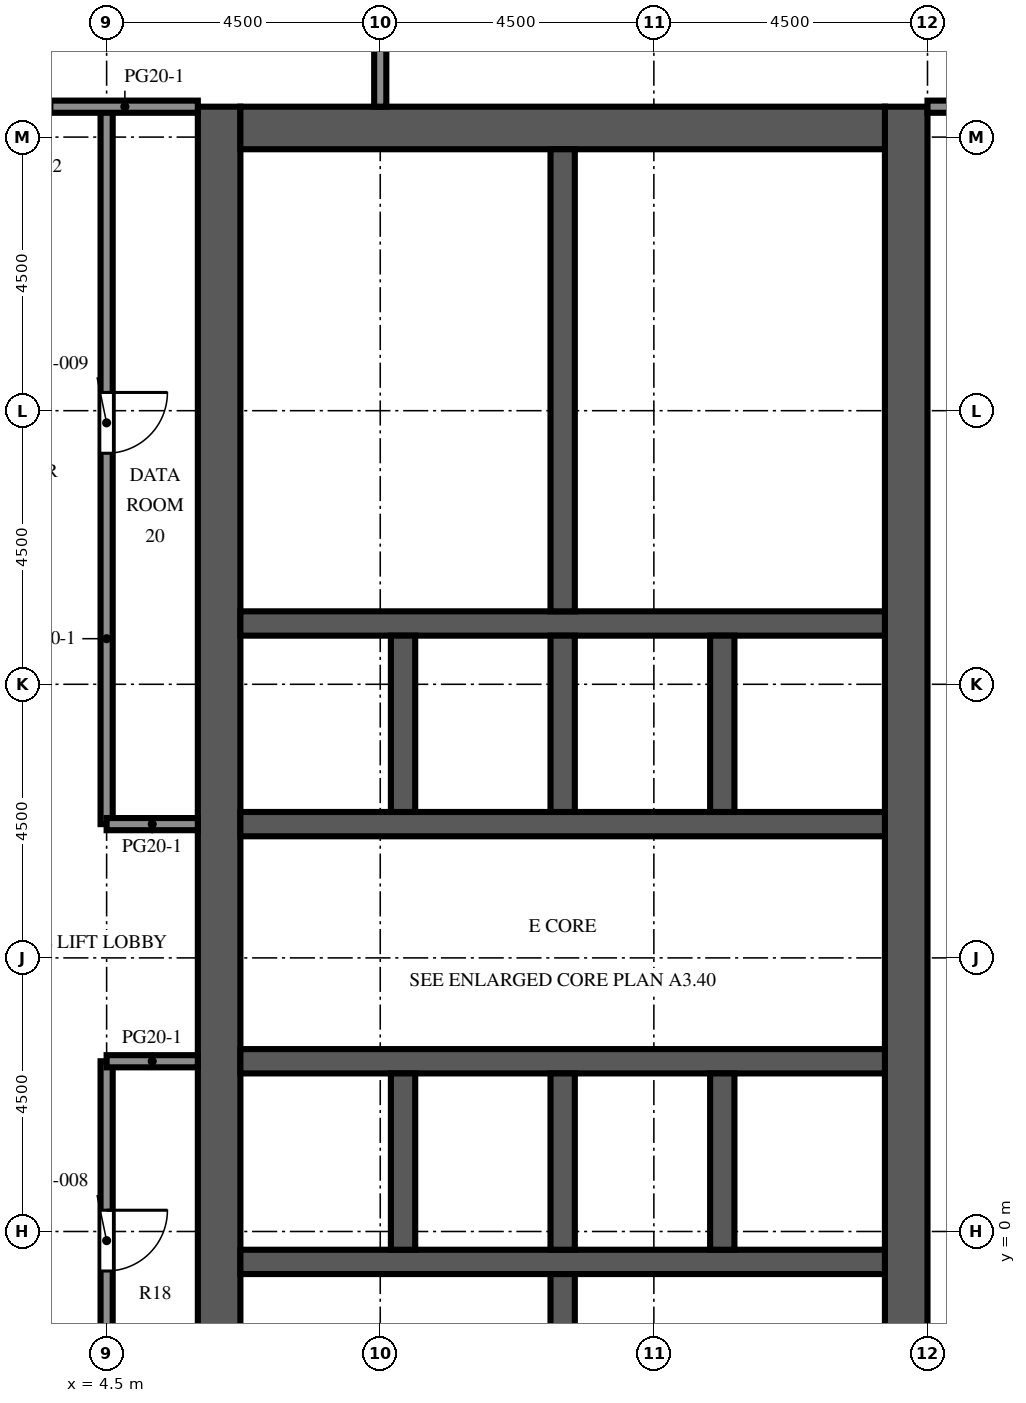
"""IFC4 building model, lengths in metres.
Left out: names, types, materials, properties, quantities, classifications, styles, units other than length and angle.
Written with IfcOpenShell. Run it as: python <this file> out.ifc"""

import sys

from ifc_helpers import new_model, si_unit, direction, frame, frame_2d, origin, place, context, subcontext, project, spatial, rectangle, extrude, element, fill, save


model = new_model("IFC4")
c1 = context("Model", 3, precision=1e-05, world=origin(), true_north=direction((0.0, 1.0)))
c2 = subcontext(c1, "Body", "Model", "MODEL_VIEW")
j1 = project(units=[si_unit("LENGTHUNIT", "METRE"), si_unit("PLANEANGLEUNIT", "RADIAN")], contexts=[c1])
p1 = place(None, origin())
s1 = spatial("IfcSite", under=j1, at=p1, CompositionType="ELEMENT")
p2 = place(p1, origin())
s2 = spatial("IfcBuilding", under=s1, at=p2, CompositionType="ELEMENT")
p3 = place(p2, frame((0.0, 0.0, 270.4)))
s3 = spatial("IfcBuildingStorey", under=s2, at=p3, CompositionType="ELEMENT", Elevation=270.4)
p4 = place(p3, frame((6.35, -9.0, 0.0), z_axis=(0.0, 0.0, 1.0), x_axis=(0.0, 1.0, 0.0)))
e1 = element("IfcWall", 1, at=p4, inside=s3, PredefinedType="SHEAR", context=c2, shape_type="SweptSolid", body=[
    extrude(rectangle(XDim=27.5, YDim=0.7, at=frame_2d((13.75, 0.0))), origin(), (0.0, 0.0, 1.0), 4.1),
])
p5 = place(p4, frame((12.55, 0.0, 0.0)))
e2 = element("IfcOpeningElement", 2, at=p5, cuts=e1, PredefinedType="OPENING", context=c2, shape_type="SweptSolid", body=[
    extrude(rectangle(XDim=2.4, YDim=2.4, at=frame_2d((1.2, 1.2))), frame((0.0, 0.36, 0.0), z_axis=(0.0, -1.0, 0.0), x_axis=(1.0, 0.0, 0.0)), (0.0, 0.0, 1.0), 0.72),
])
p6 = place(p4, frame((3.9, 0.0, 0.0)))
e3 = element("IfcOpeningElement", 3, at=p6, cuts=e1, PredefinedType="OPENING", context=c2, shape_type="SweptSolid", body=[
    extrude(rectangle(XDim=1.2, YDim=2.1, at=frame_2d((0.6, 1.05))), frame((0.0, 0.36, 0.0), z_axis=(0.0, -1.0, 0.0), x_axis=(1.0, 0.0, 0.0)), (0.0, 0.0, 1.0), 0.72),
])
p7 = place(p4, frame((19.46, 0.0, 0.0)))
e4 = element("IfcOpeningElement", 4, at=p7, cuts=e1, PredefinedType="OPENING", context=c2, shape_type="SweptSolid", body=[
    extrude(rectangle(XDim=1.0, YDim=2.1, at=frame_2d((0.5, 1.05))), frame((0.0, 0.36, 0.0), z_axis=(0.0, -1.0, 0.0), x_axis=(1.0, 0.0, 0.0)), (0.0, 0.0, 1.0), 0.72),
])
p8 = place(p4, frame((21.17, 0.0, 0.0)))
e5 = element("IfcOpeningElement", 5, at=p8, cuts=e1, PredefinedType="OPENING", context=c2, shape_type="SweptSolid", body=[
    extrude(rectangle(XDim=1.0, YDim=2.1, at=frame_2d((0.5, 1.05))), frame((0.0, 0.36, 0.0), z_axis=(0.0, -1.0, 0.0), x_axis=(1.0, 0.0, 0.0)), (0.0, 0.0, 1.0), 0.72),
])
p9 = place(p4, frame((23.26, 0.0, 0.0)))
e6 = element("IfcOpeningElement", 6, at=p9, cuts=e1, PredefinedType="OPENING", context=c2, shape_type="SweptSolid", body=[
    extrude(rectangle(XDim=1.0, YDim=2.1, at=frame_2d((0.5, 1.05))), frame((0.0, 0.36, 0.0), z_axis=(0.0, -1.0, 0.0), x_axis=(1.0, 0.0, 0.0)), (0.0, 0.0, 1.0), 0.72),
])
p10 = place(p4, frame((25.35, 0.0, 0.0)))
e7 = element("IfcOpeningElement", 7, at=p10, cuts=e1, PredefinedType="OPENING", context=c2, shape_type="SweptSolid", body=[
    extrude(rectangle(XDim=1.0, YDim=2.1, at=frame_2d((0.5, 1.05))), frame((0.0, 0.36, 0.0), z_axis=(0.0, -1.0, 0.0), x_axis=(1.0, 0.0, 0.0)), (0.0, 0.0, 1.0), 0.72),
])
p11 = place(p3, frame((17.65, -9.0, 0.0), z_axis=(0.0, 0.0, 1.0), x_axis=(0.0, 1.0, 0.0)))
e8 = element("IfcWall", 8, at=p11, inside=s3, PredefinedType="SHEAR", context=c2, shape_type="SweptSolid", body=[
    extrude(rectangle(XDim=27.5, YDim=0.7, at=frame_2d((13.75, 0.0))), origin(), (0.0, 0.0, 1.0), 4.1),
])
p12 = place(p11, frame((12.55, 0.0, 0.0)))
e9 = element("IfcOpeningElement", 9, at=p12, cuts=e8, PredefinedType="OPENING", context=c2, shape_type="SweptSolid", body=[
    extrude(rectangle(XDim=2.4, YDim=2.4, at=frame_2d((1.2, 1.2))), frame((0.0, 0.36, 0.0), z_axis=(0.0, -1.0, 0.0), x_axis=(1.0, 0.0, 0.0)), (0.0, 0.0, 1.0), 0.72),
])
p13 = place(p11, frame((6.825, 0.0, 0.0)))
e10 = element("IfcOpeningElement", 10, at=p13, cuts=e8, PredefinedType="OPENING", context=c2, shape_type="SweptSolid", body=[
    extrude(rectangle(XDim=1.2, YDim=2.1, at=frame_2d((0.6, 1.05))), frame((0.0, 0.36, 0.0), z_axis=(0.0, -1.0, 0.0), x_axis=(1.0, 0.0, 0.0)), (0.0, 0.0, 1.0), 0.72),
])
p14 = place(p11, frame((19.475, 0.0, 0.0)))
e11 = element("IfcOpeningElement", 11, at=p14, cuts=e8, PredefinedType="OPENING", context=c2, shape_type="SweptSolid", body=[
    extrude(rectangle(XDim=1.2, YDim=2.1, at=frame_2d((0.6, 1.05))), frame((0.0, 0.36, 0.0), z_axis=(0.0, -1.0, 0.0), x_axis=(1.0, 0.0, 0.0)), (0.0, 0.0, 1.0), 0.72),
])
p15 = place(p3, frame((6.7, 18.15, 0.0), z_axis=(0.0, 0.0, 1.0), x_axis=(1.0, 0.0, 0.0)))
e12 = element("IfcWall", 12, at=p15, inside=s3, PredefinedType="SHEAR", context=c2, shape_type="SweptSolid", body=[
    extrude(rectangle(XDim=10.6, YDim=0.7, at=frame_2d((5.3, 0.0))), origin(), (0.0, 0.0, 1.0), 4.1),
])
p16 = place(p3, frame((6.7, -0.5, 0.0), z_axis=(0.0, 0.0, 1.0), x_axis=(1.0, 0.0, 0.0)))
e13 = element("IfcWall", 13, at=p16, inside=s3, PredefinedType="SHEAR", context=c2, shape_type="SweptSolid", body=[
    extrude(rectangle(XDim=10.6, YDim=0.4, at=frame_2d((5.3, 0.0))), origin(), (0.0, 0.0, 1.0), 4.1),
])
p17 = place(p3, frame((6.7, 2.8, 0.0), z_axis=(0.0, 0.0, 1.0), x_axis=(1.0, 0.0, 0.0)))
e14 = element("IfcWall", 14, at=p17, inside=s3, PredefinedType="SHEAR", context=c2, shape_type="SweptSolid", body=[
    extrude(rectangle(XDim=10.6, YDim=0.4, at=frame_2d((5.3, 0.0))), origin(), (0.0, 0.0, 1.0), 4.1),
])
p18 = place(p17, frame((0.688, 0.0, 0.0)))
e15 = element("IfcOpeningElement", 15, at=p18, cuts=e14, PredefinedType="OPENING", context=c2, shape_type="SweptSolid", body=[
    extrude(rectangle(XDim=1.1, YDim=2.1, at=frame_2d((0.55, 1.05))), frame((0.0, 0.21, 0.0), z_axis=(0.0, -1.0, 0.0), x_axis=(1.0, 0.0, 0.0)), (0.0, 0.0, 1.0), 0.42),
])
p19 = place(p17, frame((3.438, 0.0, 0.0)))
e16 = element("IfcOpeningElement", 16, at=p19, cuts=e14, PredefinedType="OPENING", context=c2, shape_type="SweptSolid", body=[
    extrude(rectangle(XDim=1.1, YDim=2.1, at=frame_2d((0.55, 1.05))), frame((0.0, 0.21, 0.0), z_axis=(0.0, -1.0, 0.0), x_axis=(1.0, 0.0, 0.0)), (0.0, 0.0, 1.0), 0.42),
])
p20 = place(p17, frame((6.113, 0.0, 0.0)))
e17 = element("IfcOpeningElement", 17, at=p20, cuts=e14, PredefinedType="OPENING", context=c2, shape_type="SweptSolid", body=[
    extrude(rectangle(XDim=1.0, YDim=2.1, at=frame_2d((0.5, 1.05))), frame((0.0, 0.21, 0.0), z_axis=(0.0, -1.0, 0.0), x_axis=(1.0, 0.0, 0.0)), (0.0, 0.0, 1.0), 0.42),
])
p21 = place(p17, frame((8.863, 0.0, 0.0)))
e18 = element("IfcOpeningElement", 18, at=p21, cuts=e14, PredefinedType="OPENING", context=c2, shape_type="SweptSolid", body=[
    extrude(rectangle(XDim=1.0, YDim=2.1, at=frame_2d((0.5, 1.05))), frame((0.0, 0.21, 0.0), z_axis=(0.0, -1.0, 0.0), x_axis=(1.0, 0.0, 0.0)), (0.0, 0.0, 1.0), 0.42),
])
p22 = place(p3, frame((6.7, 6.7, 0.0), z_axis=(0.0, 0.0, 1.0), x_axis=(1.0, 0.0, 0.0)))
e19 = element("IfcWall", 19, at=p22, inside=s3, PredefinedType="SHEAR", context=c2, shape_type="SweptSolid", body=[
    extrude(rectangle(XDim=10.6, YDim=0.4, at=frame_2d((5.3, 0.0))), origin(), (0.0, 0.0, 1.0), 4.1),
])
p23 = place(p22, frame((3.438, 0.0, 0.0)))
e20 = element("IfcOpeningElement", 20, at=p23, cuts=e19, PredefinedType="OPENING", context=c2, shape_type="SweptSolid", body=[
    extrude(rectangle(XDim=1.1, YDim=2.1, at=frame_2d((0.55, 1.05))), frame((0.0, 0.21, 0.0), z_axis=(0.0, -1.0, 0.0), x_axis=(1.0, 0.0, 0.0)), (0.0, 0.0, 1.0), 0.42),
])
p24 = place(p22, frame((6.062, 0.0, 0.0)))
e21 = element("IfcOpeningElement", 21, at=p24, cuts=e19, PredefinedType="OPENING", context=c2, shape_type="SweptSolid", body=[
    extrude(rectangle(XDim=1.1, YDim=2.1, at=frame_2d((0.55, 1.05))), frame((0.0, 0.21, 0.0), z_axis=(0.0, -1.0, 0.0), x_axis=(1.0, 0.0, 0.0)), (0.0, 0.0, 1.0), 0.42),
])
p25 = place(p22, frame((8.812, 0.0, 0.0)))
e22 = element("IfcOpeningElement", 22, at=p25, cuts=e19, PredefinedType="OPENING", context=c2, shape_type="SweptSolid", body=[
    extrude(rectangle(XDim=1.1, YDim=2.1, at=frame_2d((0.55, 1.05))), frame((0.0, 0.21, 0.0), z_axis=(0.0, -1.0, 0.0), x_axis=(1.0, 0.0, 0.0)), (0.0, 0.0, 1.0), 0.42),
])
p26 = place(p22, frame((0.738, 0.0, 0.0)))
e23 = element("IfcOpeningElement", 23, at=p26, cuts=e19, PredefinedType="OPENING", context=c2, shape_type="SweptSolid", body=[
    extrude(rectangle(XDim=1.0, YDim=2.1, at=frame_2d((0.5, 1.05))), frame((0.0, 0.21, 0.0), z_axis=(0.0, -1.0, 0.0), x_axis=(1.0, 0.0, 0.0)), (0.0, 0.0, 1.0), 0.42),
])
p27 = place(p3, frame((6.7, 10.0, 0.0), z_axis=(0.0, 0.0, 1.0), x_axis=(1.0, 0.0, 0.0)))
e24 = element("IfcWall", 24, at=p27, inside=s3, PredefinedType="SHEAR", context=c2, shape_type="SweptSolid", body=[
    extrude(rectangle(XDim=10.6, YDim=0.4, at=frame_2d((5.3, 0.0))), origin(), (0.0, 0.0, 1.0), 4.1),
])
for number, where, z_axis, x_axis in (
    (25, (9.375, -0.3, 0.0), (0.0, 0.0, 1.0), (0.0, 1.0, 0.0)),
    (26, (9.375, 6.9, 0.0), (0.0, 0.0, 1.0), (0.0, 1.0, 0.0)),
    (27, (12.0, -0.3, 0.0), (0.0, 0.0, 1.0), (0.0, 1.0, 0.0)),
    (28, (12.0, 6.9, 0.0), (0.0, 0.0, 1.0), (0.0, 1.0, 0.0)),
    (29, (14.625, -0.3, 0.0), (0.0, 0.0, 1.0), (0.0, 1.0, 0.0)),
    (30, (14.625, 6.9, 0.0), (0.0, 0.0, 1.0), (0.0, 1.0, 0.0)),
):
    element("IfcWall", number, at=place(p3, frame(where, z_axis=z_axis, x_axis=x_axis)), inside=s3, PredefinedType="SHEAR", context=c2, shape_type="SweptSolid", body=[
        extrude(rectangle(XDim=2.9, YDim=0.4, at=frame_2d((1.45, 0.0))), origin(), (0.0, 0.0, 1.0), 4.1),
    ])
for number, where, z_axis, x_axis in (
    (31, (12.0, -8.3, 0.0), (0.0, 0.0, 1.0), (0.0, 1.0, 0.0)),
    (32, (12.0, 10.2, 0.0), (0.0, 0.0, 1.0), (0.0, 1.0, 0.0)),
):
    element("IfcWall", number, at=place(p3, frame(where, z_axis=z_axis, x_axis=x_axis)), inside=s3, PredefinedType="SHEAR", context=c2, shape_type="SweptSolid", body=[
        extrude(rectangle(XDim=7.6, YDim=0.4, at=frame_2d((3.8, 0.0))), origin(), (0.0, 0.0, 1.0), 4.1),
    ])
for number, where, z_axis, x_axis in (
    (33, (6.7, 11.72, 0.0), (0.0, 0.0, 1.0), (1.0, 0.0, 0.0)),
    (34, (6.7, 13.62, 0.0), (0.0, 0.0, 1.0), (1.0, 0.0, 0.0)),
    (35, (6.7, 15.9, 0.0), (0.0, 0.0, 1.0), (1.0, 0.0, 0.0)),
):
    element("IfcWall", number, at=place(p3, frame(where, z_axis=z_axis, x_axis=x_axis)), inside=s3, PredefinedType="PARTITIONING", context=c2, shape_type="SweptSolid", body=[
        extrude(rectangle(XDim=5.1, YDim=0.1, at=frame_2d((2.55, 0.0))), origin(), (0.0, 0.0, 1.0), 3.65),
    ])
p28 = place(p3, frame((4.5, 2.8, 0.0), z_axis=(0.0, 0.0, 1.0), x_axis=(0.0, -1.0, 0.0)))
e36 = element("IfcWall", 36, at=p28, inside=s3, PredefinedType="PARTITIONING", context=c2, shape_type="SweptSolid", body=[
    extrude(rectangle(XDim=6.3, YDim=0.2, at=frame_2d((3.15, 0.0))), origin(), (0.0, 0.0, 1.0), 3.65),
])
p29 = place(p28, frame((2.45, 0.0, 0.0)))
e37 = element("IfcOpeningElement", 37, at=p29, cuts=e36, PredefinedType="OPENING", context=c2, shape_type="SweptSolid", body=[
    extrude(rectangle(XDim=1.0, YDim=2.1, at=frame_2d((0.5, 1.05))), frame((0.0, 0.11, 0.0), z_axis=(0.0, -1.0, 0.0), x_axis=(1.0, 0.0, 0.0)), (0.0, 0.0, 1.0), 0.22),
])
p30 = place(p3, frame((4.5, 18.5, 0.0), z_axis=(0.0, 0.0, 1.0), x_axis=(0.0, -1.0, 0.0)))
e38 = element("IfcWall", 38, at=p30, inside=s3, PredefinedType="PARTITIONING", context=c2, shape_type="SweptSolid", body=[
    extrude(rectangle(XDim=11.8, YDim=0.2, at=frame_2d((5.9, 0.0))), origin(), (0.0, 0.0, 1.0), 3.65),
])
p31 = place(p30, frame((4.7, 0.0, 0.0)))
e39 = element("IfcOpeningElement", 39, at=p31, cuts=e38, PredefinedType="OPENING", context=c2, shape_type="SweptSolid", body=[
    extrude(rectangle(XDim=1.0, YDim=2.1, at=frame_2d((0.5, 1.05))), frame((0.0, 0.11, 0.0), z_axis=(0.0, -1.0, 0.0), x_axis=(1.0, 0.0, 0.0)), (0.0, 0.0, 1.0), 0.22),
])
p32 = place(p3, frame((9.0, 18.5, 0.0), z_axis=(0.0, 0.0, 1.0), x_axis=(0.0, 1.0, 0.0)))
e40 = element("IfcWall", 40, at=p32, inside=s3, PredefinedType="PARTITIONING", context=c2, shape_type="SweptSolid", body=[
    extrude(rectangle(XDim=3.5, YDim=0.2, at=frame_2d((1.75, 0.0))), origin(), (0.0, 0.0, 1.0), 3.65),
])
for number, where, z_axis, x_axis in (
    (41, (4.5, 2.8, 0.0), (0.0, 0.0, 1.0), (1.0, 0.0, 0.0)),
    (42, (4.5, 6.7, 0.0), (0.0, 0.0, 1.0), (1.0, 0.0, 0.0)),
):
    element("IfcWall", number, at=place(p3, frame(where, z_axis=z_axis, x_axis=x_axis)), inside=s3, PredefinedType="PARTITIONING", context=c2, shape_type="SweptSolid", body=[
        extrude(rectangle(XDim=1.5, YDim=0.2, at=frame_2d((0.75, 0.0))), origin(), (0.0, 0.0, 1.0), 3.65),
    ])
p33 = place(p3, frame((1.5, 18.5, 0.0), z_axis=(0.0, 0.0, 1.0), x_axis=(1.0, 0.0, 0.0)))
e43 = element("IfcWall", 43, at=p33, inside=s3, PredefinedType="PARTITIONING", context=c2, shape_type="SweptSolid", body=[
    extrude(rectangle(XDim=4.5, YDim=0.2, at=frame_2d((2.25, 0.0))), origin(), (0.0, 0.0, 1.0), 3.65),
])
p34 = place(p33, frame((1.1, 0.0, 0.0)))
e44 = element("IfcOpeningElement", 44, at=p34, cuts=e43, PredefinedType="OPENING", context=c2, shape_type="SweptSolid", body=[
    extrude(rectangle(XDim=1.0, YDim=2.1, at=frame_2d((0.5, 1.05))), frame((0.0, 0.11, 0.0), z_axis=(0.0, -1.0, 0.0), x_axis=(1.0, 0.0, 0.0)), (0.0, 0.0, 1.0), 0.22),
])
p35 = place(p3, frame((18.0, 18.5, 0.0), z_axis=(0.0, 0.0, 1.0), x_axis=(1.0, 0.0, 0.0)))
e45 = element("IfcWall", 45, at=p35, inside=s3, PredefinedType="PARTITIONING", context=c2, shape_type="SweptSolid", body=[
    extrude(rectangle(XDim=4.201, YDim=0.2, at=frame_2d((2.101, 0.0))), origin(), (0.0, 0.0, 1.0), 3.65),
])
p36 = place(p35, frame((2.1, 0.0, 0.0)))
e46 = element("IfcOpeningElement", 46, at=p36, cuts=e45, PredefinedType="OPENING", context=c2, shape_type="SweptSolid", body=[
    extrude(rectangle(XDim=1.0, YDim=2.1, at=frame_2d((0.5, 1.05))), frame((0.0, 0.11, 0.0), z_axis=(0.0, -1.0, 0.0), x_axis=(1.0, 0.0, 0.0)), (0.0, 0.0, 1.0), 0.22),
])
p37 = place(p18, origin())
e47 = element("IfcDoor", 47, at=p37, inside=s3, OperationType="DOUBLE_DOOR_SLIDING", PredefinedType="DOOR", context=c2, shape_type="SweptSolid", body=[
    extrude(rectangle(XDim=1.1, YDim=2.1, at=frame_2d((0.55, 1.05))), frame((0.0, 0.025, 0.0), z_axis=(0.0, -1.0, 0.0), x_axis=(1.0, 0.0, 0.0)), (0.0, 0.0, 1.0), 0.05),
])
fill(e15, e47)
p38 = place(p19, origin())
e48 = element("IfcDoor", 48, at=p38, inside=s3, OperationType="DOUBLE_DOOR_SLIDING", PredefinedType="DOOR", context=c2, shape_type="SweptSolid", body=[
    extrude(rectangle(XDim=1.1, YDim=2.1, at=frame_2d((0.55, 1.05))), frame((0.0, 0.025, 0.0), z_axis=(0.0, -1.0, 0.0), x_axis=(1.0, 0.0, 0.0)), (0.0, 0.0, 1.0), 0.05),
])
fill(e16, e48)
p39 = place(p23, origin())
e49 = element("IfcDoor", 49, at=p39, inside=s3, OperationType="DOUBLE_DOOR_SLIDING", PredefinedType="DOOR", context=c2, shape_type="SweptSolid", body=[
    extrude(rectangle(XDim=1.1, YDim=2.1, at=frame_2d((0.55, 1.05))), frame((0.0, 0.025, 0.0), z_axis=(0.0, -1.0, 0.0), x_axis=(1.0, 0.0, 0.0)), (0.0, 0.0, 1.0), 0.05),
])
fill(e20, e49)
p40 = place(p24, origin())
e50 = element("IfcDoor", 50, at=p40, inside=s3, OperationType="DOUBLE_DOOR_SLIDING", PredefinedType="DOOR", context=c2, shape_type="SweptSolid", body=[
    extrude(rectangle(XDim=1.1, YDim=2.1, at=frame_2d((0.55, 1.05))), frame((0.0, 0.025, 0.0), z_axis=(0.0, -1.0, 0.0), x_axis=(1.0, 0.0, 0.0)), (0.0, 0.0, 1.0), 0.05),
])
fill(e21, e50)
p41 = place(p25, origin())
e51 = element("IfcDoor", 51, at=p41, inside=s3, OperationType="DOUBLE_DOOR_SLIDING", PredefinedType="DOOR", context=c2, shape_type="SweptSolid", body=[
    extrude(rectangle(XDim=1.1, YDim=2.1, at=frame_2d((0.55, 1.05))), frame((0.0, 0.025, 0.0), z_axis=(0.0, -1.0, 0.0), x_axis=(1.0, 0.0, 0.0)), (0.0, 0.0, 1.0), 0.05),
])
fill(e22, e51)
p42 = place(p5, origin())
e52 = element("IfcDoor", 52, at=p42, inside=s3, OperationType="DOUBLE_DOOR_DOUBLE_SWING", PredefinedType="DOOR", context=c2, shape_type="SweptSolid", body=[
    extrude(rectangle(XDim=2.4, YDim=2.4, at=frame_2d((1.2, 1.2))), frame((0.0, 0.025, 0.0), z_axis=(0.0, -1.0, 0.0), x_axis=(1.0, 0.0, 0.0)), (0.0, 0.0, 1.0), 0.05),
])
fill(e2, e52)
p43 = place(p12, origin())
e53 = element("IfcDoor", 53, at=p43, inside=s3, OperationType="DOUBLE_DOOR_DOUBLE_SWING", PredefinedType="DOOR", context=c2, shape_type="SweptSolid", body=[
    extrude(rectangle(XDim=2.4, YDim=2.4, at=frame_2d((1.2, 1.2))), frame((0.0, 0.025, 0.0), z_axis=(0.0, -1.0, 0.0), x_axis=(1.0, 0.0, 0.0)), (0.0, 0.0, 1.0), 0.05),
])
fill(e9, e53)
p44 = place(p13, frame((1.2, 0.0, 0.0), z_axis=(0.0, 0.0, 1.0), x_axis=(-1.0, 0.0, 0.0)))
e54 = element("IfcDoor", 54, at=p44, inside=s3, OperationType="SINGLE_SWING_LEFT", PredefinedType="DOOR", context=c2, shape_type="SweptSolid", body=[
    extrude(rectangle(XDim=1.2, YDim=2.1, at=frame_2d((0.6, 1.05))), frame((0.0, 0.025, 0.0), z_axis=(0.0, -1.0, 0.0), x_axis=(1.0, 0.0, 0.0)), (0.0, 0.0, 1.0), 0.05),
])
fill(e10, e54)
p45 = place(p14, frame((1.2, 0.0, 0.0), z_axis=(0.0, 0.0, 1.0), x_axis=(-1.0, 0.0, 0.0)))
e55 = element("IfcDoor", 55, at=p45, inside=s3, OperationType="SINGLE_SWING_LEFT", PredefinedType="DOOR", context=c2, shape_type="SweptSolid", body=[
    extrude(rectangle(XDim=1.2, YDim=2.1, at=frame_2d((0.6, 1.05))), frame((0.0, 0.025, 0.0), z_axis=(0.0, -1.0, 0.0), x_axis=(1.0, 0.0, 0.0)), (0.0, 0.0, 1.0), 0.05),
])
fill(e11, e55)
p46 = place(p20, origin())
e56 = element("IfcDoor", 56, at=p46, inside=s3, OperationType="SINGLE_SWING_LEFT", PredefinedType="DOOR", context=c2, shape_type="SweptSolid", body=[
    extrude(rectangle(XDim=1.0, YDim=2.1, at=frame_2d((0.5, 1.05))), frame((0.0, 0.025, 0.0), z_axis=(0.0, -1.0, 0.0), x_axis=(1.0, 0.0, 0.0)), (0.0, 0.0, 1.0), 0.05),
])
fill(e17, e56)
p47 = place(p21, origin())
e57 = element("IfcDoor", 57, at=p47, inside=s3, OperationType="SINGLE_SWING_RIGHT", PredefinedType="DOOR", context=c2, shape_type="SweptSolid", body=[
    extrude(rectangle(XDim=1.0, YDim=2.1, at=frame_2d((0.5, 1.05))), frame((0.0, 0.025, 0.0), z_axis=(0.0, -1.0, 0.0), x_axis=(1.0, 0.0, 0.0)), (0.0, 0.0, 1.0), 0.05),
])
fill(e18, e57)
p48 = place(p26, origin())
e58 = element("IfcDoor", 58, at=p48, inside=s3, OperationType="SINGLE_SWING_LEFT", PredefinedType="DOOR", context=c2, shape_type="SweptSolid", body=[
    extrude(rectangle(XDim=1.0, YDim=2.1, at=frame_2d((0.5, 1.05))), frame((0.0, 0.025, 0.0), z_axis=(0.0, -1.0, 0.0), x_axis=(1.0, 0.0, 0.0)), (0.0, 0.0, 1.0), 0.05),
])
fill(e23, e58)
p49 = place(p7, origin())
e59 = element("IfcDoor", 59, at=p49, inside=s3, OperationType="SINGLE_SWING_RIGHT", PredefinedType="DOOR", context=c2, shape_type="SweptSolid", body=[
    extrude(rectangle(XDim=1.0, YDim=2.1, at=frame_2d((0.5, 1.05))), frame((0.0, -0.275, 0.0), z_axis=(0.0, -1.0, 0.0), x_axis=(1.0, 0.0, 0.0)), (0.0, 0.0, 1.0), 0.05),
])
fill(e4, e59)
p50 = place(p8, origin())
e60 = element("IfcDoor", 60, at=p50, inside=s3, OperationType="SINGLE_SWING_LEFT", PredefinedType="DOOR", context=c2, shape_type="SweptSolid", body=[
    extrude(rectangle(XDim=1.0, YDim=2.1, at=frame_2d((0.5, 1.05))), frame((0.0, -0.275, 0.0), z_axis=(0.0, -1.0, 0.0), x_axis=(1.0, 0.0, 0.0)), (0.0, 0.0, 1.0), 0.05),
])
fill(e5, e60)
p51 = place(p9, origin())
e61 = element("IfcDoor", 61, at=p51, inside=s3, OperationType="SINGLE_SWING_RIGHT", PredefinedType="DOOR", context=c2, shape_type="SweptSolid", body=[
    extrude(rectangle(XDim=1.0, YDim=2.1, at=frame_2d((0.5, 1.05))), frame((0.0, -0.275, 0.0), z_axis=(0.0, -1.0, 0.0), x_axis=(1.0, 0.0, 0.0)), (0.0, 0.0, 1.0), 0.05),
])
fill(e6, e61)
p52 = place(p10, origin())
e62 = element("IfcDoor", 62, at=p52, inside=s3, OperationType="SINGLE_SWING_LEFT", PredefinedType="DOOR", context=c2, shape_type="SweptSolid", body=[
    extrude(rectangle(XDim=1.0, YDim=2.1, at=frame_2d((0.5, 1.05))), frame((0.0, -0.275, 0.0), z_axis=(0.0, -1.0, 0.0), x_axis=(1.0, 0.0, 0.0)), (0.0, 0.0, 1.0), 0.05),
])
fill(e7, e62)
p53 = place(p29, origin())
e63 = element("IfcDoor", 63, at=p53, inside=s3, OperationType="SINGLE_SWING_LEFT", PredefinedType="DOOR", context=c2, shape_type="SweptSolid", body=[
    extrude(rectangle(XDim=1.0, YDim=2.1, at=frame_2d((0.5, 1.05))), frame((0.0, 0.025, 0.0), z_axis=(0.0, -1.0, 0.0), x_axis=(1.0, 0.0, 0.0)), (0.0, 0.0, 1.0), 0.05),
])
fill(e37, e63)
p54 = place(p31, origin())
e64 = element("IfcDoor", 64, at=p54, inside=s3, OperationType="SINGLE_SWING_LEFT", PredefinedType="DOOR", context=c2, shape_type="SweptSolid", body=[
    extrude(rectangle(XDim=1.0, YDim=2.1, at=frame_2d((0.5, 1.05))), frame((0.0, 0.025, 0.0), z_axis=(0.0, -1.0, 0.0), x_axis=(1.0, 0.0, 0.0)), (0.0, 0.0, 1.0), 0.05),
])
fill(e39, e64)
save(model, sys.argv[1])
